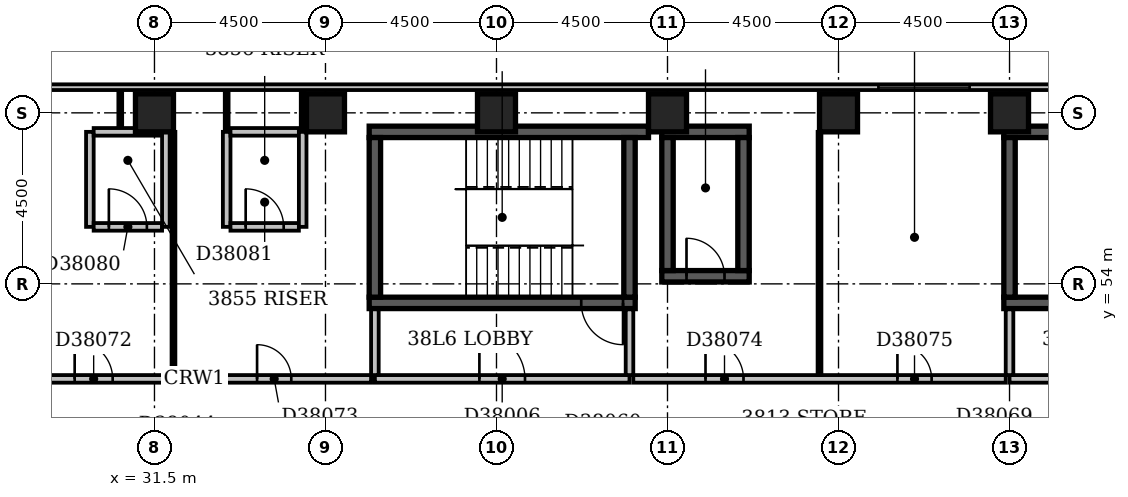
"""IFC4 building model, lengths in metres.
Left out: names, types, materials, properties, quantities, classifications, styles, units other than length and angle.
Written with IfcOpenShell. Run it as: python <this file> out.ifc"""

import sys

from ifc_helpers import new_model, si_unit, direction, frame, frame_2d, origin, origin_2d, place, context, subcontext, project, spatial, rectangle, extrude, element, fill, save


model = new_model("IFC4")
c1 = context("Model", 3, precision=1e-05, world=origin(), true_north=direction((0.0, 1.0)))
c2 = subcontext(c1, "Body", "Model", "MODEL_VIEW")
j1 = project(units=[si_unit("LENGTHUNIT", "METRE"), si_unit("PLANEANGLEUNIT", "RADIAN")], contexts=[c1])
p1 = place(None, origin())
s1 = spatial("IfcSite", under=j1, at=p1, CompositionType="ELEMENT")
p2 = place(p1, origin())
s2 = spatial("IfcBuilding", under=s1, at=p2, CompositionType="ELEMENT")
p3 = place(p2, frame((0.0, 0.0, 152.0)))
s3 = spatial("IfcBuildingStorey", under=s2, at=p3, CompositionType="ELEMENT", Elevation=152.0)
p4 = place(p3, frame((37.15, 53.5, -0.3), z_axis=(0.0, 0.0, 1.0), x_axis=(1.0, 0.0, 0.0)))
e1 = element("IfcWall", 1, at=p4, inside=s3, PredefinedType="SHEAR", context=c2, shape_type="SweptSolid", body=[
    extrude(rectangle(XDim=7.0, YDim=0.3, at=frame_2d((3.5, 0.0))), origin(), (0.0, 0.0, 1.0), 3.6),
])
p5 = place(p4, frame((5.58, 0.0, 0.3)))
e2 = element("IfcOpeningElement", 2, at=p5, cuts=e1, PredefinedType="OPENING", context=c2, shape_type="SweptSolid", body=[
    extrude(rectangle(XDim=1.1, YDim=2.1, at=frame_2d((0.55, 1.05))), frame((0.0, 0.162, 0.0), z_axis=(0.0, -1.0, 0.0), x_axis=(1.0, 0.0, 0.0)), (0.0, 0.0, 1.0), 0.324),
])
p6 = place(p3, frame((37.15, 58.0, -0.3), z_axis=(0.0, 0.0, 1.0), x_axis=(1.0, 0.0, 0.0)))
e3 = element("IfcWall", 3, at=p6, inside=s3, PredefinedType="SHEAR", context=c2, shape_type="SweptSolid", body=[
    extrude(rectangle(XDim=7.35, YDim=0.3, at=frame_2d((3.675, 0.0))), origin(), (0.0, 0.0, 1.0), 3.6),
])
for number, where, z_axis, x_axis in (
    (4, (37.3, 53.65, -0.3), (0.0, 0.0, 1.0), (0.0, 1.0, 0.0)),
    (5, (44.0, 53.65, -0.3), (0.0, 0.0, 1.0), (0.0, 1.0, 0.0)),
):
    element("IfcWall", number, at=place(p3, frame(where, z_axis=z_axis, x_axis=x_axis)), inside=s3, PredefinedType="SHEAR", context=c2, shape_type="SweptSolid", body=[
        extrude(rectangle(XDim=4.2, YDim=0.3, at=frame_2d((2.1, 0.0))), origin(), (0.0, 0.0, 1.0), 3.6),
    ])
p7 = place(p3, frame((44.85, 54.2, -0.3), z_axis=(0.0, 0.0, 1.0), x_axis=(1.0, 0.0, 0.0)))
e6 = element("IfcWall", 6, at=p7, inside=s3, PredefinedType="SHEAR", context=c2, shape_type="SweptSolid", body=[
    extrude(rectangle(XDim=2.3, YDim=0.3, at=frame_2d((1.15, 0.0))), origin(), (0.0, 0.0, 1.0), 3.6),
])
p8 = place(p7, frame((0.65, 0.0, 0.3)))
e7 = element("IfcOpeningElement", 7, at=p8, cuts=e6, PredefinedType="OPENING", context=c2, shape_type="SweptSolid", body=[
    extrude(rectangle(XDim=1.0, YDim=2.1, at=frame_2d((0.5, 1.05))), frame((0.0, 0.162, 0.0), z_axis=(0.0, -1.0, 0.0), x_axis=(1.0, 0.0, 0.0)), (0.0, 0.0, 1.0), 0.324),
])
p9 = place(p3, frame((44.85, 58.0, -0.3), z_axis=(0.0, 0.0, 1.0), x_axis=(1.0, 0.0, 0.0)))
e8 = element("IfcWall", 8, at=p9, inside=s3, PredefinedType="SHEAR", context=c2, shape_type="SweptSolid", body=[
    extrude(rectangle(XDim=2.3, YDim=0.3, at=frame_2d((1.15, 0.0))), origin(), (0.0, 0.0, 1.0), 3.6),
])
for number, where, z_axis, x_axis in (
    (9, (45.0, 54.35, -0.3), (0.0, 0.0, 1.0), (0.0, 1.0, 0.0)),
    (10, (47.0, 54.35, -0.3), (0.0, 0.0, 1.0), (0.0, 1.0, 0.0)),
):
    element("IfcWall", number, at=place(p3, frame(where, z_axis=z_axis, x_axis=x_axis)), inside=s3, PredefinedType="SHEAR", context=c2, shape_type="SweptSolid", body=[
        extrude(rectangle(XDim=3.5, YDim=0.3, at=frame_2d((1.75, 0.0))), origin(), (0.0, 0.0, 1.0), 3.6),
    ])
p10 = place(p3, frame((53.85, 53.5, -0.3), z_axis=(0.0, 0.0, 1.0), x_axis=(1.0, 0.0, 0.0)))
e11 = element("IfcWall", 11, at=p10, inside=s3, PredefinedType="SHEAR", context=c2, shape_type="SweptSolid", body=[
    extrude(rectangle(XDim=7.0, YDim=0.3, at=frame_2d((3.5, 0.0))), origin(), (0.0, 0.0, 1.0), 3.6),
])
p11 = place(p10, frame((5.58, 0.0, 0.3)))
e12 = element("IfcOpeningElement", 12, at=p11, cuts=e11, PredefinedType="OPENING", context=c2, shape_type="SweptSolid", body=[
    extrude(rectangle(XDim=1.1, YDim=2.1, at=frame_2d((0.55, 1.05))), frame((0.0, 0.162, 0.0), z_axis=(0.0, -1.0, 0.0), x_axis=(1.0, 0.0, 0.0)), (0.0, 0.0, 1.0), 0.324),
])
p12 = place(p3, frame((53.85, 58.0, -0.3), z_axis=(0.0, 0.0, 1.0), x_axis=(1.0, 0.0, 0.0)))
e13 = element("IfcWall", 13, at=p12, inside=s3, PredefinedType="SHEAR", context=c2, shape_type="SweptSolid", body=[
    extrude(rectangle(XDim=7.0, YDim=0.3, at=frame_2d((3.5, 0.0))), origin(), (0.0, 0.0, 1.0), 3.6),
])
p13 = place(p3, frame((54.0, 53.65, -0.3), z_axis=(0.0, 0.0, 1.0), x_axis=(0.0, 1.0, 0.0)))
e14 = element("IfcWall", 14, at=p13, inside=s3, PredefinedType="SHEAR", context=c2, shape_type="SweptSolid", body=[
    extrude(rectangle(XDim=4.2, YDim=0.3, at=frame_2d((2.1, 0.0))), origin(), (0.0, 0.0, 1.0), 3.6),
])
for number, where, z_axis, x_axis in (
    (15, (31.5, 58.5, -0.3), (0.0, 0.0, 1.0), (1.0, 0.0, 0.0)),
    (16, (36.0, 58.5, -0.3), (0.0, 0.0, 1.0), (1.0, 0.0, 0.0)),
    (17, (40.5, 58.5, -0.3), (0.0, 0.0, 1.0), (1.0, 0.0, 0.0)),
    (18, (45.0, 58.5, -0.3), (0.0, 0.0, 1.0), (1.0, 0.0, 0.0)),
    (19, (49.5, 58.5, -0.3), (0.0, 0.0, 1.0), (1.0, 0.0, 0.0)),
    (20, (54.0, 58.5, -0.3), (0.0, 0.0, 1.0), (1.0, 0.0, 0.0)),
):
    element("IfcColumn", number, at=place(p3, frame(where, z_axis=z_axis, x_axis=x_axis)), inside=s3, PredefinedType="COLUMN", context=c2, shape_type="SweptSolid", body=[
        extrude(rectangle(XDim=1.0, YDim=1.0, at=origin_2d()), origin(), (0.0, 0.0, 1.0), 3.6),
    ])
p14 = place(p3, frame((68.1, 59.175, 0.0), z_axis=(0.0, 0.0, 1.0), x_axis=(-1.0, 0.0, 0.0)))
e21 = element("IfcWall", 21, at=p14, inside=s3, PredefinedType="STANDARD", context=c2, shape_type="SweptSolid", body=[
    extrude(rectangle(XDim=68.85, YDim=0.15, at=frame_2d((34.425, 0.0))), origin(), (0.0, 0.0, 1.0), 2.7),
])
p15 = place(p14, frame((1.65, 0.0, 0.6)))
e22 = element("IfcOpeningElement", 22, at=p15, cuts=e21, PredefinedType="OPENING", context=c2, shape_type="SweptSolid", body=[
    extrude(rectangle(XDim=2.4, YDim=1.8, at=frame_2d((1.2, 0.9))), frame((0.0, 0.087, 0.0), z_axis=(0.0, -1.0, 0.0), x_axis=(1.0, 0.0, 0.0)), (0.0, 0.0, 1.0), 0.174),
])
p16 = place(p14, frame((5.86, 0.0, 0.6)))
e23 = element("IfcOpeningElement", 23, at=p16, cuts=e21, PredefinedType="OPENING", context=c2, shape_type="SweptSolid", body=[
    extrude(rectangle(XDim=1.8, YDim=1.8, at=frame_2d((0.9, 0.9))), frame((0.0, 0.087, 0.0), z_axis=(0.0, -1.0, 0.0), x_axis=(1.0, 0.0, 0.0)), (0.0, 0.0, 1.0), 0.174),
])
p17 = place(p14, frame((15.15, 0.0, 0.6)))
e24 = element("IfcOpeningElement", 24, at=p17, cuts=e21, PredefinedType="OPENING", context=c2, shape_type="SweptSolid", body=[
    extrude(rectangle(XDim=2.4, YDim=1.8, at=frame_2d((1.2, 0.9))), frame((0.0, 0.087, 0.0), z_axis=(0.0, -1.0, 0.0), x_axis=(1.0, 0.0, 0.0)), (0.0, 0.0, 1.0), 0.174),
])
p18 = place(p3, frame((37.3, 51.5, 0.0), z_axis=(0.0, 0.0, 1.0), x_axis=(1.0, 0.0, 0.0)))
e25 = element("IfcWall", 25, at=p18, inside=s3, PredefinedType="PARTITIONING", context=c2, shape_type="SweptSolid", body=[
    extrude(rectangle(XDim=6.7, YDim=0.2, at=frame_2d((3.35, 0.0))), origin(), (0.0, 0.0, 1.0), 3.3),
])
p19 = place(p18, frame((2.75, 0.0, 0.0)))
e26 = element("IfcOpeningElement", 26, at=p19, cuts=e25, PredefinedType="OPENING", context=c2, shape_type="SweptSolid", body=[
    extrude(rectangle(XDim=1.2, YDim=2.1, at=frame_2d((0.6, 1.05))), frame((0.0, 0.112, 0.0), z_axis=(0.0, -1.0, 0.0), x_axis=(1.0, 0.0, 0.0)), (0.0, 0.0, 1.0), 0.224),
])
for number, where, z_axis, x_axis in (
    (27, (44.0, 51.6, 0.0), (0.0, 0.0, 1.0), (0.0, 1.0, 0.0)),
    (28, (37.3, 51.6, 0.0), (0.0, 0.0, 1.0), (0.0, 1.0, 0.0)),
):
    element("IfcWall", number, at=place(p3, frame(where, z_axis=z_axis, x_axis=x_axis)), inside=s3, PredefinedType="PARTITIONING", context=c2, shape_type="SweptSolid", body=[
        extrude(rectangle(XDim=1.73, YDim=0.2, at=frame_2d((0.865, 0.0))), origin(), (0.0, 0.0, 1.0), 3.3),
    ])
p20 = place(p3, frame((54.0, 51.5, 0.0), z_axis=(0.0, 0.0, 1.0), x_axis=(1.0, 0.0, 0.0)))
e29 = element("IfcWall", 29, at=p20, inside=s3, PredefinedType="PARTITIONING", context=c2, shape_type="SweptSolid", body=[
    extrude(rectangle(XDim=6.7, YDim=0.2, at=frame_2d((3.35, 0.0))), origin(), (0.0, 0.0, 1.0), 3.3),
])
p21 = place(p20, frame((2.75, 0.0, 0.0)))
e30 = element("IfcOpeningElement", 30, at=p21, cuts=e29, PredefinedType="OPENING", context=c2, shape_type="SweptSolid", body=[
    extrude(rectangle(XDim=1.2, YDim=2.1, at=frame_2d((0.6, 1.05))), frame((0.0, 0.112, 0.0), z_axis=(0.0, -1.0, 0.0), x_axis=(1.0, 0.0, 0.0)), (0.0, 0.0, 1.0), 0.224),
])
p22 = place(p3, frame((54.0, 51.6, 0.0), z_axis=(0.0, 0.0, 1.0), x_axis=(0.0, 1.0, 0.0)))
e31 = element("IfcWall", 31, at=p22, inside=s3, PredefinedType="PARTITIONING", context=c2, shape_type="SweptSolid", body=[
    extrude(rectangle(XDim=1.73, YDim=0.2, at=frame_2d((0.865, 0.0))), origin(), (0.0, 0.0, 1.0), 2.6),
])
p23 = place(p3, frame((27.9, 51.5, 0.0), z_axis=(0.0, 0.0, 1.0), x_axis=(1.0, 0.0, 0.0)))
e32 = element("IfcWall", 32, at=p23, inside=s3, PredefinedType="PARTITIONING", context=c2, shape_type="SweptSolid", body=[
    extrude(rectangle(XDim=9.3, YDim=0.2, at=frame_2d((4.65, 0.0))), origin(), (0.0, 0.0, 1.0), 3.3),
])
p24 = place(p23, frame((1.5, 0.0, 0.0)))
e33 = element("IfcOpeningElement", 33, at=p24, cuts=e32, PredefinedType="OPENING", context=c2, shape_type="SweptSolid", body=[
    extrude(rectangle(XDim=1.0, YDim=2.1, at=frame_2d((0.5, 1.05))), frame((0.0, 0.112, 0.0), z_axis=(0.0, -1.0, 0.0), x_axis=(1.0, 0.0, 0.0)), (0.0, 0.0, 1.0), 0.224),
])
p25 = place(p23, frame((6.3, 0.0, 0.0)))
e34 = element("IfcOpeningElement", 34, at=p25, cuts=e32, PredefinedType="OPENING", context=c2, shape_type="SweptSolid", body=[
    extrude(rectangle(XDim=0.9, YDim=2.1, at=frame_2d((0.45, 1.05))), frame((0.0, 0.112, 0.0), z_axis=(0.0, -1.0, 0.0), x_axis=(1.0, 0.0, 0.0)), (0.0, 0.0, 1.0), 0.224),
])
p26 = place(p3, frame((44.1, 51.5, 0.0), z_axis=(0.0, 0.0, 1.0), x_axis=(1.0, 0.0, 0.0)))
e35 = element("IfcWall", 35, at=p26, inside=s3, PredefinedType="PARTITIONING", context=c2, shape_type="SweptSolid", body=[
    extrude(rectangle(XDim=9.8, YDim=0.2, at=frame_2d((4.9, 0.0))), origin(), (0.0, 0.0, 1.0), 3.3),
])
p27 = place(p26, frame((1.9, 0.0, 0.0)))
e36 = element("IfcOpeningElement", 36, at=p27, cuts=e35, PredefinedType="OPENING", context=c2, shape_type="SweptSolid", body=[
    extrude(rectangle(XDim=1.0, YDim=2.1, at=frame_2d((0.5, 1.05))), frame((0.0, 0.112, 0.0), z_axis=(0.0, -1.0, 0.0), x_axis=(1.0, 0.0, 0.0)), (0.0, 0.0, 1.0), 0.224),
])
p28 = place(p26, frame((6.95, 0.0, 0.0)))
e37 = element("IfcOpeningElement", 37, at=p28, cuts=e35, PredefinedType="OPENING", context=c2, shape_type="SweptSolid", body=[
    extrude(rectangle(XDim=0.9, YDim=2.1, at=frame_2d((0.45, 1.05))), frame((0.0, 0.112, 0.0), z_axis=(0.0, -1.0, 0.0), x_axis=(1.0, 0.0, 0.0)), (0.0, 0.0, 1.0), 0.224),
])
for number, where, z_axis, x_axis in (
    (38, (32.0, 51.6, 0.0), (0.0, 0.0, 1.0), (0.0, 1.0, 0.0)),
    (39, (49.0, 51.6, 0.0), (0.0, 0.0, 1.0), (0.0, 1.0, 0.0)),
):
    element("IfcWall", number, at=place(p3, frame(where, z_axis=z_axis, x_axis=x_axis)), inside=s3, PredefinedType="PARTITIONING", context=c2, shape_type="SweptSolid", body=[
        extrude(rectangle(XDim=6.4, YDim=0.1, at=frame_2d((3.2, 0.0))), origin(), (0.0, 0.0, 1.0), 3.3),
    ])
p29 = place(p3, frame((29.8, 55.5, 0.0), z_axis=(0.0, 0.0, 1.0), x_axis=(0.0, 1.0, 0.0)))
e40 = element("IfcWall", 40, at=p29, inside=s3, PredefinedType="PARTITIONING", context=c2, shape_type="SweptSolid", body=[
    extrude(rectangle(XDim=2.5, YDim=0.2, at=frame_2d((1.25, 0.0))), origin(), (0.0, 0.0, 1.0), 3.3),
])
p30 = place(p3, frame((29.9, 55.5, 0.0), z_axis=(0.0, 0.0, 1.0), x_axis=(1.0, 0.0, 0.0)))
e41 = element("IfcWall", 41, at=p30, inside=s3, PredefinedType="PARTITIONING", context=c2, shape_type="SweptSolid", body=[
    extrude(rectangle(XDim=1.8, YDim=0.2, at=frame_2d((0.9, 0.0))), origin(), (0.0, 0.0, 1.0), 3.3),
])
p31 = place(p30, frame((0.4, 0.0, 0.0)))
e42 = element("IfcOpeningElement", 42, at=p31, cuts=e41, PredefinedType="OPENING", context=c2, shape_type="SweptSolid", body=[
    extrude(rectangle(XDim=1.0, YDim=2.1, at=frame_2d((0.5, 1.05))), frame((0.0, 0.112, 0.0), z_axis=(0.0, -1.0, 0.0), x_axis=(1.0, 0.0, 0.0)), (0.0, 0.0, 1.0), 0.224),
])
for number, where, z_axis, x_axis in (
    (43, (31.8, 55.5, 0.0), (0.0, 0.0, 1.0), (0.0, 1.0, 0.0)),
    (44, (33.4, 55.5, 0.0), (0.0, 0.0, 1.0), (0.0, 1.0, 0.0)),
):
    element("IfcWall", number, at=place(p3, frame(where, z_axis=z_axis, x_axis=x_axis)), inside=s3, PredefinedType="PARTITIONING", context=c2, shape_type="SweptSolid", body=[
        extrude(rectangle(XDim=2.5, YDim=0.2, at=frame_2d((1.25, 0.0))), origin(), (0.0, 0.0, 1.0), 3.3),
    ])
p32 = place(p3, frame((33.5, 55.5, 0.0), z_axis=(0.0, 0.0, 1.0), x_axis=(1.0, 0.0, 0.0)))
e45 = element("IfcWall", 45, at=p32, inside=s3, PredefinedType="PARTITIONING", context=c2, shape_type="SweptSolid", body=[
    extrude(rectangle(XDim=1.8, YDim=0.2, at=frame_2d((0.9, 0.0))), origin(), (0.0, 0.0, 1.0), 3.3),
])
p33 = place(p32, frame((0.4, 0.0, 0.0)))
e46 = element("IfcOpeningElement", 46, at=p33, cuts=e45, PredefinedType="OPENING", context=c2, shape_type="SweptSolid", body=[
    extrude(rectangle(XDim=1.0, YDim=2.1, at=frame_2d((0.5, 1.05))), frame((0.0, 0.112, 0.0), z_axis=(0.0, -1.0, 0.0), x_axis=(1.0, 0.0, 0.0)), (0.0, 0.0, 1.0), 0.224),
])
p34 = place(p3, frame((35.4, 55.5, 0.0), z_axis=(0.0, 0.0, 1.0), x_axis=(0.0, 1.0, 0.0)))
e47 = element("IfcWall", 47, at=p34, inside=s3, PredefinedType="PARTITIONING", context=c2, shape_type="SweptSolid", body=[
    extrude(rectangle(XDim=2.5, YDim=0.2, at=frame_2d((1.25, 0.0))), origin(), (0.0, 0.0, 1.0), 2.4),
])
p35 = place(p3, frame((29.9, 58.0, 0.0), z_axis=(0.0, 0.0, 1.0), x_axis=(1.0, 0.0, 0.0)))
e48 = element("IfcWall", 48, at=p35, inside=s3, PredefinedType="PARTITIONING", context=c2, shape_type="SweptSolid", body=[
    extrude(rectangle(XDim=1.8, YDim=0.2, at=frame_2d((0.9, 0.0))), origin(), (0.0, 0.0, 1.0), 3.3),
])
p36 = place(p3, frame((33.4, 58.0, 0.0), z_axis=(0.0, 0.0, 1.0), x_axis=(0.0, 1.0, 0.0)))
e49 = element("IfcWall", 49, at=p36, inside=s3, PredefinedType="PARTITIONING", context=c2, shape_type="SweptSolid", body=[
    extrude(rectangle(XDim=1.1, YDim=0.1, at=frame_2d((0.55, 0.0))), origin(), (0.0, 0.0, 1.0), 3.3),
])
p37 = place(p3, frame((33.5, 58.0, 0.0), z_axis=(0.0, 0.0, 1.0), x_axis=(1.0, 0.0, 0.0)))
e50 = element("IfcWall", 50, at=p37, inside=s3, PredefinedType="PARTITIONING", context=c2, shape_type="SweptSolid", body=[
    extrude(rectangle(XDim=1.8, YDim=0.2, at=frame_2d((0.9, 0.0))), origin(), (0.0, 0.0, 1.0), 3.3),
])
p38 = place(p3, frame((35.4, 58.0, 0.0), z_axis=(0.0, 0.0, 1.0), x_axis=(0.0, 1.0, 0.0)))
e51 = element("IfcWall", 51, at=p38, inside=s3, PredefinedType="PARTITIONING", context=c2, shape_type="SweptSolid", body=[
    extrude(rectangle(XDim=1.1, YDim=0.1, at=frame_2d((0.55, 0.0))), origin(), (0.0, 0.0, 1.0), 2.4),
])
p39 = place(p3, frame((30.6, 58.1, 0.0), z_axis=(0.0, 0.0, 1.0), x_axis=(0.0, 1.0, 0.0)))
e52 = element("IfcWall", 52, at=p39, inside=s3, PredefinedType="PARTITIONING", context=c2, shape_type="SweptSolid", body=[
    extrude(rectangle(XDim=1.0, YDim=0.1, at=frame_2d((0.5, 0.0))), origin(), (0.0, 0.0, 1.0), 3.3),
])
p40 = place(p17, origin())
e53 = element("IfcWindow", 53, at=p40, inside=s3, PartitioningType="SINGLE_PANEL", PredefinedType="WINDOW", context=c2, shape_type="SweptSolid", body=[
    extrude(rectangle(XDim=2.4, YDim=1.8, at=frame_2d((1.2, 0.9))), frame((0.0, 0.03, 0.0), z_axis=(0.0, -1.0, 0.0), x_axis=(1.0, 0.0, 0.0)), (0.0, 0.0, 1.0), 0.06),
])
fill(e24, e53)
p41 = place(p19, origin())
e54 = element("IfcDoor", 54, at=p41, inside=s3, OperationType="SINGLE_SWING_LEFT", PredefinedType="DOOR", context=c2, shape_type="SweptSolid", body=[
    extrude(rectangle(XDim=1.2, YDim=2.1, at=frame_2d((0.6, 1.05))), frame((0.0, 0.025, 0.0), z_axis=(0.0, -1.0, 0.0), x_axis=(1.0, 0.0, 0.0)), (0.0, 0.0, 1.0), 0.05),
])
fill(e26, e54)
p42 = place(p8, origin())
e55 = element("IfcDoor", 55, at=p42, inside=s3, OperationType="SINGLE_SWING_LEFT", PredefinedType="DOOR", context=c2, shape_type="SweptSolid", body=[
    extrude(rectangle(XDim=1.0, YDim=2.1, at=frame_2d((0.5, 1.05))), frame((0.0, 0.025, 0.0), z_axis=(0.0, -1.0, 0.0), x_axis=(1.0, 0.0, 0.0)), (0.0, 0.0, 1.0), 0.05),
])
fill(e7, e55)
p43 = place(p5, origin())
e56 = element("IfcDoor", 56, at=p43, inside=s3, OperationType="SINGLE_SWING_RIGHT", PredefinedType="DOOR", context=c2, shape_type="SweptSolid", body=[
    extrude(rectangle(XDim=1.1, YDim=2.1, at=frame_2d((0.55, 1.05))), frame((0.0, 0.025, 0.0), z_axis=(0.0, -1.0, 0.0), x_axis=(1.0, 0.0, 0.0)), (0.0, 0.0, 1.0), 0.05),
])
fill(e2, e56)
p44 = place(p24, origin())
e57 = element("IfcDoor", 57, at=p44, inside=s3, OperationType="SINGLE_SWING_LEFT", PredefinedType="DOOR", context=c2, shape_type="SweptSolid", body=[
    extrude(rectangle(XDim=1.0, YDim=2.1, at=frame_2d((0.5, 1.05))), frame((0.0, 0.025, 0.0), z_axis=(0.0, -1.0, 0.0), x_axis=(1.0, 0.0, 0.0)), (0.0, 0.0, 1.0), 0.05),
])
fill(e33, e57)
p45 = place(p25, origin())
e58 = element("IfcDoor", 58, at=p45, inside=s3, OperationType="SINGLE_SWING_LEFT", PredefinedType="DOOR", context=c2, shape_type="SweptSolid", body=[
    extrude(rectangle(XDim=0.9, YDim=2.1, at=frame_2d((0.45, 1.05))), frame((0.0, 0.025, 0.0), z_axis=(0.0, -1.0, 0.0), x_axis=(1.0, 0.0, 0.0)), (0.0, 0.0, 1.0), 0.05),
])
fill(e34, e58)
p46 = place(p27, origin())
e59 = element("IfcDoor", 59, at=p46, inside=s3, OperationType="SINGLE_SWING_LEFT", PredefinedType="DOOR", context=c2, shape_type="SweptSolid", body=[
    extrude(rectangle(XDim=1.0, YDim=2.1, at=frame_2d((0.5, 1.05))), frame((0.0, 0.025, 0.0), z_axis=(0.0, -1.0, 0.0), x_axis=(1.0, 0.0, 0.0)), (0.0, 0.0, 1.0), 0.05),
])
fill(e36, e59)
p47 = place(p28, origin())
e60 = element("IfcDoor", 60, at=p47, inside=s3, OperationType="SINGLE_SWING_LEFT", PredefinedType="DOOR", context=c2, shape_type="SweptSolid", body=[
    extrude(rectangle(XDim=0.9, YDim=2.1, at=frame_2d((0.45, 1.05))), frame((0.0, 0.025, 0.0), z_axis=(0.0, -1.0, 0.0), x_axis=(1.0, 0.0, 0.0)), (0.0, 0.0, 1.0), 0.05),
])
fill(e37, e60)
p48 = place(p31, origin())
e61 = element("IfcDoor", 61, at=p48, inside=s3, OperationType="SINGLE_SWING_LEFT", PredefinedType="DOOR", context=c2, shape_type="SweptSolid", body=[
    extrude(rectangle(XDim=1.0, YDim=2.1, at=frame_2d((0.5, 1.05))), frame((0.0, 0.025, 0.0), z_axis=(0.0, -1.0, 0.0), x_axis=(1.0, 0.0, 0.0)), (0.0, 0.0, 1.0), 0.05),
])
fill(e42, e61)
p49 = place(p33, origin())
e62 = element("IfcDoor", 62, at=p49, inside=s3, OperationType="SINGLE_SWING_LEFT", PredefinedType="DOOR", context=c2, shape_type="SweptSolid", body=[
    extrude(rectangle(XDim=1.0, YDim=2.1, at=frame_2d((0.5, 1.05))), frame((0.0, 0.025, 0.0), z_axis=(0.0, -1.0, 0.0), x_axis=(1.0, 0.0, 0.0)), (0.0, 0.0, 1.0), 0.05),
])
fill(e46, e62)
save(model, sys.argv[1])
